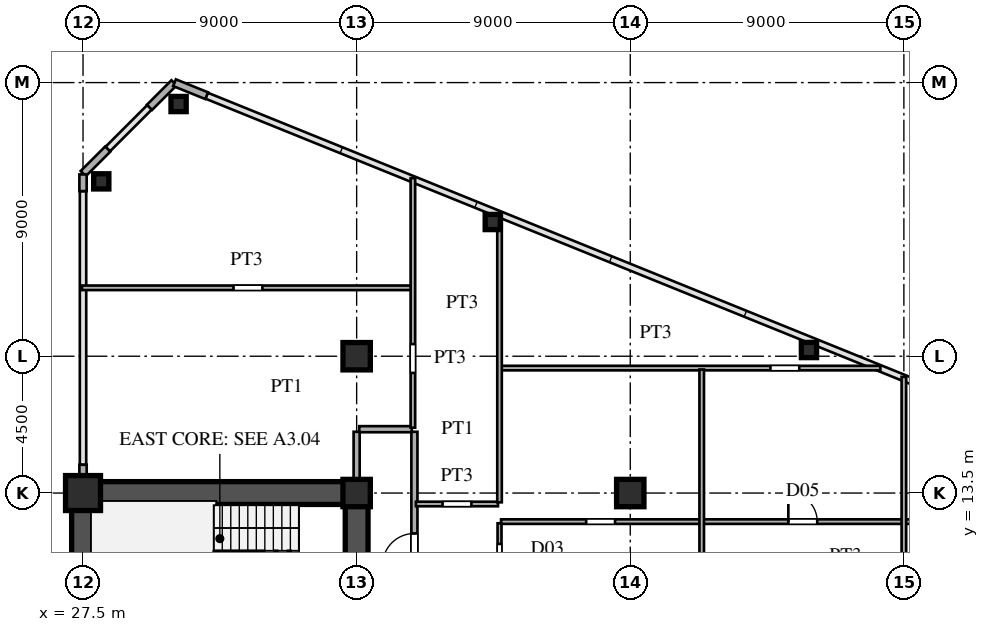
"""IFC4 building model, lengths in metres.
Left out: names, types, materials, properties, quantities, classifications, styles, units other than length and angle.
Written with IfcOpenShell. Run it as: python <this file> out.ifc"""

import sys

from ifc_helpers import new_model, si_unit, direction, frame, frame_2d, origin, origin_2d, place, context, subcontext, project, spatial, rectangle, hollow_rectangle, i_section, extrude, source, transform, mapped, element, fill, save


model = new_model("IFC4")
c1 = context("Model", 3, precision=1e-05, world=origin(), true_north=direction((0.0, 1.0)))
c2 = subcontext(c1, "Body", "Model", "MODEL_VIEW")
j1 = project(units=[si_unit("LENGTHUNIT", "METRE"), si_unit("PLANEANGLEUNIT", "RADIAN")], contexts=[c1])
p1 = place(None, origin())
s1 = spatial("IfcSite", under=j1, at=p1, CompositionType="ELEMENT")
p2 = place(p1, origin())
s2 = spatial("IfcBuilding", under=s1, at=p2, CompositionType="ELEMENT")
p3 = place(p2, frame((0.0, 0.0, 29.7)))
s3 = spatial("IfcBuildingStorey", under=s2, at=p3, CompositionType="ELEMENT", Elevation=29.7)
m1 = source(origin(), c2, "Body", "SweptSolid", [
    extrude(hollow_rectangle(XDim=1.15, YDim=1.15, WallThickness=0.048, at=origin_2d()), origin(), (0.0, 0.0, 1.0), 3.6),
])
p4 = place(p3, frame((27.5, 13.5, 0.0), z_axis=(0.0, 0.0, 1.0), x_axis=(1.0, 0.0, 0.0)))
e1 = element("IfcColumn", 1, at=p4, inside=s3, PredefinedType="COLUMN", context=c2, shape_type="MappedRepresentation", body=[
    mapped(m1, transform((0.0, 0.0, 0.0), scale=1.0)),
])
m2 = source(origin(), c2, "Body", "SweptSolid", [
    extrude(i_section(OverallWidth=0.9, OverallDepth=0.9, WebThickness=0.036, FlangeThickness=0.055, at=origin_2d()), origin(), (0.0, 0.0, 1.0), 3.6),
])
for number, where, z_axis, x_axis in (
    (2, (36.5, 13.5, 0.0), (0.0, 0.0, 1.0), (1.0, 0.0, 0.0)),
    (3, (36.5, 18.0, 0.0), (0.0, 0.0, 1.0), (1.0, 0.0, 0.0)),
    (4, (45.5, 13.5, 0.0), (0.0, 0.0, 1.0), (1.0, 0.0, 0.0)),
):
    element("IfcColumn", number, at=place(p3, frame(where, z_axis=z_axis, x_axis=x_axis)), inside=s3, PredefinedType="COLUMN", context=c2, shape_type="MappedRepresentation", body=[
        mapped(m2, transform((0.0, 0.0, 0.0), scale=1.0)),
    ])
m3 = source(origin(), c2, "Body", "SweptSolid", [
    extrude(hollow_rectangle(XDim=0.5, YDim=0.5, WallThickness=0.02, at=origin_2d()), origin(), (0.0, 0.0, 1.0), 3.6),
])
for number, where, z_axis, x_axis in (
    (5, (30.643, 26.295, 0.0), (0.0, 0.0, 1.0), (1.0, 0.0, 0.0)),
    (6, (28.1, 23.751, 0.0), (0.0, 0.0, 1.0), (1.0, 0.0, 0.0)),
    (7, (40.977, 22.414, 0.0), (0.0, 0.0, 1.0), (1.0, 0.0, 0.0)),
    (8, (51.378, 18.204, 0.0), (0.0, 0.0, 1.0), (1.0, 0.0, 0.0)),
):
    element("IfcColumn", number, at=place(p3, frame(where, z_axis=z_axis, x_axis=x_axis)), inside=s3, PredefinedType="COLUMN", context=c2, shape_type="MappedRepresentation", body=[
        mapped(m3, transform((0.0, 0.0, 0.0), scale=1.0)),
    ])
p5 = place(p3, frame((31.566, 26.569, 0.0), z_axis=(0.0, 0.0, 1.0), x_axis=(-0.927007103665, 0.375043770452, 0.0)))
e9 = element("IfcWall", 9, at=p5, inside=s3, PredefinedType="SOLIDWALL", context=c2, shape_type="SweptSolid", body=[
    extrude(rectangle(XDim=1.14, YDim=0.24, at=frame_2d((0.57, 0.0))), origin(), (0.0, 0.0, 1.0), 3.38),
])
for number, where, z_axis, x_axis in (
    (10, (30.493, 26.993, 0.0), (0.0, 0.0, 1.0), (-0.707, -0.707, 0.0)),
    (11, (28.313, 24.813, 0.0), (0.0, 0.0, 1.0), (-0.707, -0.707, 0.0)),
):
    element("IfcWall", number, at=place(p3, frame(where, z_axis=z_axis, x_axis=x_axis)), inside=s3, PredefinedType="SOLIDWALL", context=c2, shape_type="SweptSolid", body=[
        extrude(rectangle(XDim=1.14, YDim=0.24, at=frame_2d((0.57, 0.0))), origin(), (0.0, 0.0, 1.0), 3.38),
    ])
p6 = place(p3, frame((27.5, 13.88, 0.0), z_axis=(0.0, 0.0, 1.0), x_axis=(0.0, 1.0, 0.0)))
e12 = element("IfcWall", 12, at=p6, inside=s3, PredefinedType="SOLIDWALL", context=c2, shape_type="SweptSolid", body=[
    extrude(rectangle(XDim=0.55, YDim=0.24, at=frame_2d((0.275, 0.0))), origin(), (0.0, 0.0, 1.0), 2.88),
])
p7 = place(p3, frame((27.5, 23.43, 0.0), z_axis=(0.0, 0.0, 1.0), x_axis=(0.0, 1.0, 0.0)))
e13 = element("IfcWall", 13, at=p7, inside=s3, PredefinedType="SOLIDWALL", context=c2, shape_type="SweptSolid", body=[
    extrude(rectangle(XDim=0.55, YDim=0.24, at=frame_2d((0.275, 0.0))), origin(), (0.0, 0.0, 1.0), 3.38),
])
p8 = place(p3, frame((27.5, 1.3, 0.0), z_axis=(0.0, 0.0, 1.0), x_axis=(0.0, 1.0, 0.0)))
e14 = element("IfcWall", 14, at=p8, inside=s3, PredefinedType="SHEAR", context=c2, shape_type="SweptSolid", body=[
    extrude(rectangle(XDim=12.2, YDim=0.75, at=frame_2d((6.1, 0.0))), origin(), (0.0, 0.0, 1.0), 3.38),
])
p9 = place(p3, frame((27.5, 13.5, 0.0), z_axis=(0.0, 0.0, 1.0), x_axis=(1.0, 0.0, 0.0)))
e15 = element("IfcWall", 15, at=p9, inside=s3, PredefinedType="SHEAR", context=c2, shape_type="SweptSolid", body=[
    extrude(rectangle(XDim=9.0, YDim=0.75, at=frame_2d((4.5, 0.0))), origin(), (0.0, 0.0, 1.0), 3.38),
])
p10 = place(p3, frame((36.5, 8.2, 0.0), z_axis=(0.0, 0.0, 1.0), x_axis=(0.0, 1.0, 0.0)))
e16 = element("IfcWall", 16, at=p10, inside=s3, PredefinedType="SHEAR", context=c2, shape_type="SweptSolid", body=[
    extrude(rectangle(XDim=5.45, YDim=0.75, at=frame_2d((2.725, 0.0))), origin(), (0.0, 0.0, 1.0), 3.38),
])
p11 = place(p10, frame((0.245, 0.0, 0.0)))
e17 = element("IfcOpeningElement", 17, at=p11, cuts=e16, PredefinedType="OPENING", context=c2, shape_type="SweptSolid", body=[
    extrude(rectangle(XDim=0.95, YDim=2.15, at=frame_2d((0.475, 1.075))), frame((0.0, 0.385, 0.0), z_axis=(0.0, -1.0, 0.0), x_axis=(1.0, 0.0, 0.0)), (0.0, 0.0, 1.0), 0.77),
])
p12 = place(p3, frame((41.25, 12.56, 0.0), z_axis=(0.0, 0.0, 1.0), x_axis=(1.0, 0.0, 0.0)))
e18 = element("IfcWall", 18, at=p12, inside=s3, PredefinedType="PARTITIONING", context=c2, shape_type="SweptSolid", body=[
    extrude(rectangle(XDim=24.969, YDim=0.15, at=frame_2d((12.484, 0.0))), origin(), (0.0, 0.0, 1.0), 3.38),
])
p13 = place(p12, frame((2.8, 0.0, 0.0)))
e19 = element("IfcOpeningElement", 19, at=p13, cuts=e18, PredefinedType="OPENING", context=c2, shape_type="SweptSolid", body=[
    extrude(rectangle(XDim=0.95, YDim=2.15, at=frame_2d((0.475, 1.075))), frame((0.0, 0.085, 0.0), z_axis=(0.0, -1.0, 0.0), x_axis=(1.0, 0.0, 0.0)), (0.0, 0.0, 1.0), 0.17),
])
p14 = place(p12, frame((15.625, 0.0, 0.0)))
e20 = element("IfcOpeningElement", 20, at=p14, cuts=e18, PredefinedType="OPENING", context=c2, shape_type="SweptSolid", body=[
    extrude(rectangle(XDim=0.95, YDim=2.15, at=frame_2d((0.475, 1.075))), frame((0.0, 0.085, 0.0), z_axis=(0.0, -1.0, 0.0), x_axis=(1.0, 0.0, 0.0)), (0.0, 0.0, 1.0), 0.17),
])
p15 = place(p12, frame((9.45, 0.0, 0.0)))
e21 = element("IfcOpeningElement", 21, at=p15, cuts=e18, PredefinedType="OPENING", context=c2, shape_type="SweptSolid", body=[
    extrude(rectangle(XDim=0.95, YDim=2.15, at=frame_2d((0.475, 1.075))), frame((0.0, 0.085, 0.0), z_axis=(0.0, -1.0, 0.0), x_axis=(1.0, 0.0, 0.0)), (0.0, 0.0, 1.0), 0.17),
])
p16 = place(p3, frame((38.45, 13.14, 0.0), z_axis=(0.0, 0.0, 1.0), x_axis=(1.0, 0.0, 0.0)))
e22 = element("IfcWall", 22, at=p16, inside=s3, PredefinedType="PARTITIONING", context=c2, shape_type="SweptSolid", body=[
    extrude(rectangle(XDim=2.7, YDim=0.15, at=frame_2d((1.35, 0.0))), origin(), (0.0, 0.0, 1.0), 3.38),
])
p17 = place(p16, frame((0.875, 0.0, 0.0)))
e23 = element("IfcOpeningElement", 23, at=p17, cuts=e22, PredefinedType="OPENING", context=c2, shape_type="SweptSolid", body=[
    extrude(rectangle(XDim=0.95, YDim=2.15, at=frame_2d((0.475, 1.075))), frame((0.0, 0.085, 0.0), z_axis=(0.0, -1.0, 0.0), x_axis=(1.0, 0.0, 0.0)), (0.0, 0.0, 1.0), 0.17),
])
p18 = place(p3, frame((36.585, 15.6, 0.0), z_axis=(0.0, 0.0, 1.0), x_axis=(1.0, 0.0, 0.0)))
e24 = element("IfcWall", 24, at=p18, inside=s3, PredefinedType="PARTITIONING", context=c2, shape_type="SweptSolid", body=[
    extrude(rectangle(XDim=1.73, YDim=0.2, at=frame_2d((0.865, 0.0))), origin(), (0.0, 0.0, 1.0), 3.38),
])
p19 = place(p3, frame((41.25, 17.61, 0.0), z_axis=(0.0, 0.0, 1.0), x_axis=(1.0, 0.0, 0.0)))
e25 = element("IfcWall", 25, at=p19, inside=s3, PredefinedType="PARTITIONING", context=c2, shape_type="SweptSolid", body=[
    extrude(rectangle(XDim=12.477, YDim=0.15, at=frame_2d((6.239, 0.0))), origin(), (0.0, 0.0, 1.0), 3.38),
])
p20 = place(p19, frame((8.86, 0.0, 0.0)))
e26 = element("IfcOpeningElement", 26, at=p20, cuts=e25, PredefinedType="OPENING", context=c2, shape_type="SweptSolid", body=[
    extrude(rectangle(XDim=0.95, YDim=2.15, at=frame_2d((0.475, 1.075))), frame((0.0, 0.085, 0.0), z_axis=(0.0, -1.0, 0.0), x_axis=(1.0, 0.0, 0.0)), (0.0, 0.0, 1.0), 0.17),
])
p21 = place(p3, frame((27.465, 20.25, 0.0), z_axis=(0.0, 0.0, 1.0), x_axis=(1.0, 0.0, 0.0)))
e27 = element("IfcWall", 27, at=p21, inside=s3, PredefinedType="PARTITIONING", context=c2, shape_type="SweptSolid", body=[
    extrude(rectangle(XDim=10.835, YDim=0.15, at=frame_2d((5.417, 0.0))), origin(), (0.0, 0.0, 1.0), 3.38),
])
p22 = place(p21, frame((4.985, 0.0, 0.0)))
e28 = element("IfcOpeningElement", 28, at=p22, cuts=e27, PredefinedType="OPENING", context=c2, shape_type="SweptSolid", body=[
    extrude(rectangle(XDim=0.95, YDim=2.15, at=frame_2d((0.475, 1.075))), frame((0.0, 0.085, 0.0), z_axis=(0.0, -1.0, 0.0), x_axis=(1.0, 0.0, 0.0)), (0.0, 0.0, 1.0), 0.17),
])
p23 = place(p3, frame((36.5, 13.88, 0.0), z_axis=(0.0, 0.0, 1.0), x_axis=(0.0, 1.0, 0.0)))
e29 = element("IfcWall", 29, at=p23, inside=s3, PredefinedType="PARTITIONING", context=c2, shape_type="SweptSolid", body=[
    extrude(rectangle(XDim=1.635, YDim=0.2, at=frame_2d((0.817, 0.0))), origin(), (0.0, 0.0, 1.0), 2.68),
])
p24 = place(p3, frame((38.35, 15.65, 0.0), z_axis=(0.0, 0.0, 1.0), x_axis=(0.0, 1.0, 0.0)))
e30 = element("IfcWall", 30, at=p24, inside=s3, PredefinedType="PARTITIONING", context=c2, shape_type="SweptSolid", body=[
    extrude(rectangle(XDim=8.208, YDim=0.15, at=frame_2d((4.104, 0.0))), origin(), (0.0, 0.0, 1.0), 3.38),
])
p25 = place(p24, frame((1.8, 0.0, 0.0)))
e31 = element("IfcOpeningElement", 31, at=p25, cuts=e30, PredefinedType="OPENING", context=c2, shape_type="SweptSolid", body=[
    extrude(rectangle(XDim=0.95, YDim=2.15, at=frame_2d((0.475, 1.075))), frame((0.0, 0.085, 0.0), z_axis=(0.0, -1.0, 0.0), x_axis=(1.0, 0.0, 0.0)), (0.0, 0.0, 1.0), 0.17),
])
p26 = place(p3, frame((38.4, -15.515, 0.0), z_axis=(0.0, 0.0, 1.0), x_axis=(0.0, 1.0, 0.0)))
e32 = element("IfcWall", 32, at=p26, inside=s3, PredefinedType="PARTITIONING", context=c2, shape_type="SweptSolid", body=[
    extrude(rectangle(XDim=31.03, YDim=0.2, at=frame_2d((15.515, 0.0))), origin(), (0.0, 0.0, 1.0), 3.38),
])
p27 = place(p26, frame((4.163, 0.0, 0.0)))
e33 = element("IfcOpeningElement", 33, at=p27, cuts=e32, PredefinedType="OPENING", context=c2, shape_type="SweptSolid", body=[
    extrude(rectangle(XDim=1.05, YDim=2.25, at=frame_2d((0.525, 1.125))), frame((0.0, 0.11, 0.0), z_axis=(0.0, -1.0, 0.0), x_axis=(1.0, 0.0, 0.0)), (0.0, 0.0, 1.0), 0.22),
])
p28 = place(p26, frame((15.538, 0.0, 0.0)))
e34 = element("IfcOpeningElement", 34, at=p28, cuts=e32, PredefinedType="OPENING", context=c2, shape_type="SweptSolid", body=[
    extrude(rectangle(XDim=1.05, YDim=2.25, at=frame_2d((0.525, 1.125))), frame((0.0, 0.11, 0.0), z_axis=(0.0, -1.0, 0.0), x_axis=(1.0, 0.0, 0.0)), (0.0, 0.0, 1.0), 0.22),
])
p29 = place(p26, frame((26.635, 0.0, 0.0)))
e35 = element("IfcOpeningElement", 35, at=p29, cuts=e32, PredefinedType="OPENING", context=c2, shape_type="SweptSolid", body=[
    extrude(rectangle(XDim=1.05, YDim=2.25, at=frame_2d((0.525, 1.125))), frame((0.0, 0.11, 0.0), z_axis=(0.0, -1.0, 0.0), x_axis=(1.0, 0.0, 0.0)), (0.0, 0.0, 1.0), 0.22),
])
p30 = place(p3, frame((41.2, 3.502, 0.0), z_axis=(0.0, 0.0, 1.0), x_axis=(0.0, 1.0, 0.0)))
e36 = element("IfcWall", 36, at=p30, inside=s3, PredefinedType="PARTITIONING", context=c2, shape_type="SweptSolid", body=[
    extrude(rectangle(XDim=9.004, YDim=0.13, at=frame_2d((4.502, 0.0))), origin(), (0.0, 0.0, 1.0), 3.38),
])
p31 = place(p30, frame((7.374, 0.0, 0.0)))
e37 = element("IfcOpeningElement", 37, at=p31, cuts=e36, PredefinedType="OPENING", context=c2, shape_type="SweptSolid", body=[
    extrude(rectangle(XDim=0.95, YDim=2.15, at=frame_2d((0.475, 1.075))), frame((0.0, 0.075, 0.0), z_axis=(0.0, -1.0, 0.0), x_axis=(1.0, 0.0, 0.0)), (0.0, 0.0, 1.0), 0.15),
])
p32 = place(p3, frame((41.2, 13.195, 0.0), z_axis=(0.0, 0.0, 1.0), x_axis=(0.0, 1.0, 0.0)))
e38 = element("IfcWall", 38, at=p32, inside=s3, PredefinedType="PARTITIONING", context=c2, shape_type="SweptSolid", body=[
    extrude(rectangle(XDim=9.509, YDim=0.15, at=frame_2d((4.754, 0.0))), origin(), (0.0, 0.0, 1.0), 3.38),
])
p33 = place(p3, frame((47.85, -17.063, 0.0), z_axis=(0.0, 0.0, 1.0), x_axis=(0.0, 1.0, 0.0)))
e39 = element("IfcWall", 39, at=p33, inside=s3, PredefinedType="PARTITIONING", context=c2, shape_type="SweptSolid", body=[
    extrude(rectangle(XDim=34.626, YDim=0.15, at=frame_2d((17.313, 0.0))), origin(), (0.0, 0.0, 1.0), 3.38),
])
p34 = place(p33, frame((7.81, 0.0, 0.0)))
e40 = element("IfcOpeningElement", 40, at=p34, cuts=e39, PredefinedType="OPENING", context=c2, shape_type="SweptSolid", body=[
    extrude(rectangle(XDim=0.95, YDim=2.15, at=frame_2d((0.475, 1.075))), frame((0.0, 0.085, 0.0), z_axis=(0.0, -1.0, 0.0), x_axis=(1.0, 0.0, 0.0)), (0.0, 0.0, 1.0), 0.17),
])
p35 = place(p33, frame((2.253, 0.0, 0.0)))
e41 = element("IfcOpeningElement", 41, at=p35, cuts=e39, PredefinedType="OPENING", context=c2, shape_type="SweptSolid", body=[
    extrude(rectangle(XDim=0.95, YDim=2.15, at=frame_2d((0.475, 1.075))), frame((0.0, 0.085, 0.0), z_axis=(0.0, -1.0, 0.0), x_axis=(1.0, 0.0, 0.0)), (0.0, 0.0, 1.0), 0.17),
])
p36 = place(p33, frame((17.338, 0.0, 0.0)))
e42 = element("IfcOpeningElement", 42, at=p36, cuts=e39, PredefinedType="OPENING", context=c2, shape_type="SweptSolid", body=[
    extrude(rectangle(XDim=0.95, YDim=2.15, at=frame_2d((0.475, 1.075))), frame((0.0, 0.085, 0.0), z_axis=(0.0, -1.0, 0.0), x_axis=(1.0, 0.0, 0.0)), (0.0, 0.0, 1.0), 0.17),
])
p37 = place(p33, frame((26.616, 0.0, 0.0)))
e43 = element("IfcOpeningElement", 43, at=p37, cuts=e39, PredefinedType="OPENING", context=c2, shape_type="SweptSolid", body=[
    extrude(rectangle(XDim=0.95, YDim=2.15, at=frame_2d((0.475, 1.075))), frame((0.0, 0.085, 0.0), z_axis=(0.0, -1.0, 0.0), x_axis=(1.0, 0.0, 0.0)), (0.0, 0.0, 1.0), 0.17),
])
p38 = place(p3, frame((54.5, -17.063, 0.0), z_axis=(0.0, 0.0, 1.0), x_axis=(0.0, 1.0, 0.0)))
e44 = element("IfcWall", 44, at=p38, inside=s3, PredefinedType="PARTITIONING", context=c2, shape_type="SweptSolid", body=[
    extrude(rectangle(XDim=34.384, YDim=0.15, at=frame_2d((17.192, 0.0))), origin(), (0.0, 0.0, 1.0), 2.68),
])
p39 = place(p38, frame((7.81, 0.0, 0.0)))
e45 = element("IfcOpeningElement", 45, at=p39, cuts=e44, PredefinedType="OPENING", context=c2, shape_type="SweptSolid", body=[
    extrude(rectangle(XDim=0.95, YDim=2.15, at=frame_2d((0.475, 1.075))), frame((0.0, 0.085, 0.0), z_axis=(0.0, -1.0, 0.0), x_axis=(1.0, 0.0, 0.0)), (0.0, 0.0, 1.0), 0.17),
])
p40 = place(p38, frame((17.338, 0.0, 0.0)))
e46 = element("IfcOpeningElement", 46, at=p40, cuts=e44, PredefinedType="OPENING", context=c2, shape_type="SweptSolid", body=[
    extrude(rectangle(XDim=0.95, YDim=2.15, at=frame_2d((0.475, 1.075))), frame((0.0, 0.085, 0.0), z_axis=(0.0, -1.0, 0.0), x_axis=(1.0, 0.0, 0.0)), (0.0, 0.0, 1.0), 0.17),
])
p41 = place(p38, frame((13.131, 0.0, 0.0)))
e47 = element("IfcOpeningElement", 47, at=p41, cuts=e44, PredefinedType="OPENING", context=c2, shape_type="SweptSolid", body=[
    extrude(rectangle(XDim=0.95, YDim=2.15, at=frame_2d((0.475, 1.075))), frame((0.0, 0.085, 0.0), z_axis=(0.0, -1.0, 0.0), x_axis=(1.0, 0.0, 0.0)), (0.0, 0.0, 1.0), 0.17),
])
p42 = place(p38, frame((22.131, 0.0, 0.0)))
e48 = element("IfcOpeningElement", 48, at=p42, cuts=e44, PredefinedType="OPENING", context=c2, shape_type="SweptSolid", body=[
    extrude(rectangle(XDim=0.95, YDim=2.15, at=frame_2d((0.475, 1.075))), frame((0.0, 0.085, 0.0), z_axis=(0.0, -1.0, 0.0), x_axis=(1.0, 0.0, 0.0)), (0.0, 0.0, 1.0), 0.17),
])
p43 = place(p38, frame((26.616, 0.0, 0.0)))
e49 = element("IfcOpeningElement", 49, at=p43, cuts=e44, PredefinedType="OPENING", context=c2, shape_type="SweptSolid", body=[
    extrude(rectangle(XDim=0.95, YDim=2.15, at=frame_2d((0.475, 1.075))), frame((0.0, 0.085, 0.0), z_axis=(0.0, -1.0, 0.0), x_axis=(1.0, 0.0, 0.0)), (0.0, 0.0, 1.0), 0.17),
])
m4 = source(origin(), c2, "Body", "SweptSolid", [
    extrude(rectangle(XDim=0.95, YDim=2.15, at=frame_2d((0.475, 1.075))), frame((0.0, 0.025, 0.0), z_axis=(0.0, -1.0, 0.0), x_axis=(1.0, 0.0, 0.0)), (0.0, 0.0, 1.0), 0.05),
])
p44 = place(p15, origin())
e50 = element("IfcDoor", 50, at=p44, inside=s3, OperationType="SINGLE_SWING_LEFT", PredefinedType="DOOR", context=c2, shape_type="MappedRepresentation", body=[
    mapped(m4, transform((0.0, 0.0, 0.0), scale=1.0)),
])
fill(e21, e50)
m5 = source(origin(), c2, "Body", "SweptSolid", [
    extrude(rectangle(XDim=1.05, YDim=2.25, at=frame_2d((0.525, 1.125))), frame((0.0, 0.025, 0.0), z_axis=(0.0, -1.0, 0.0), x_axis=(1.0, 0.0, 0.0)), (0.0, 0.0, 1.0), 0.05),
])
p45 = place(p29, origin())
e51 = element("IfcDoor", 51, at=p45, inside=s3, OperationType="SINGLE_SWING_LEFT", PredefinedType="DOOR", context=c2, shape_type="MappedRepresentation", body=[
    mapped(m5, transform((0.0, 0.0, 0.0), scale=1.0)),
])
fill(e35, e51)
save(model, sys.argv[1])
